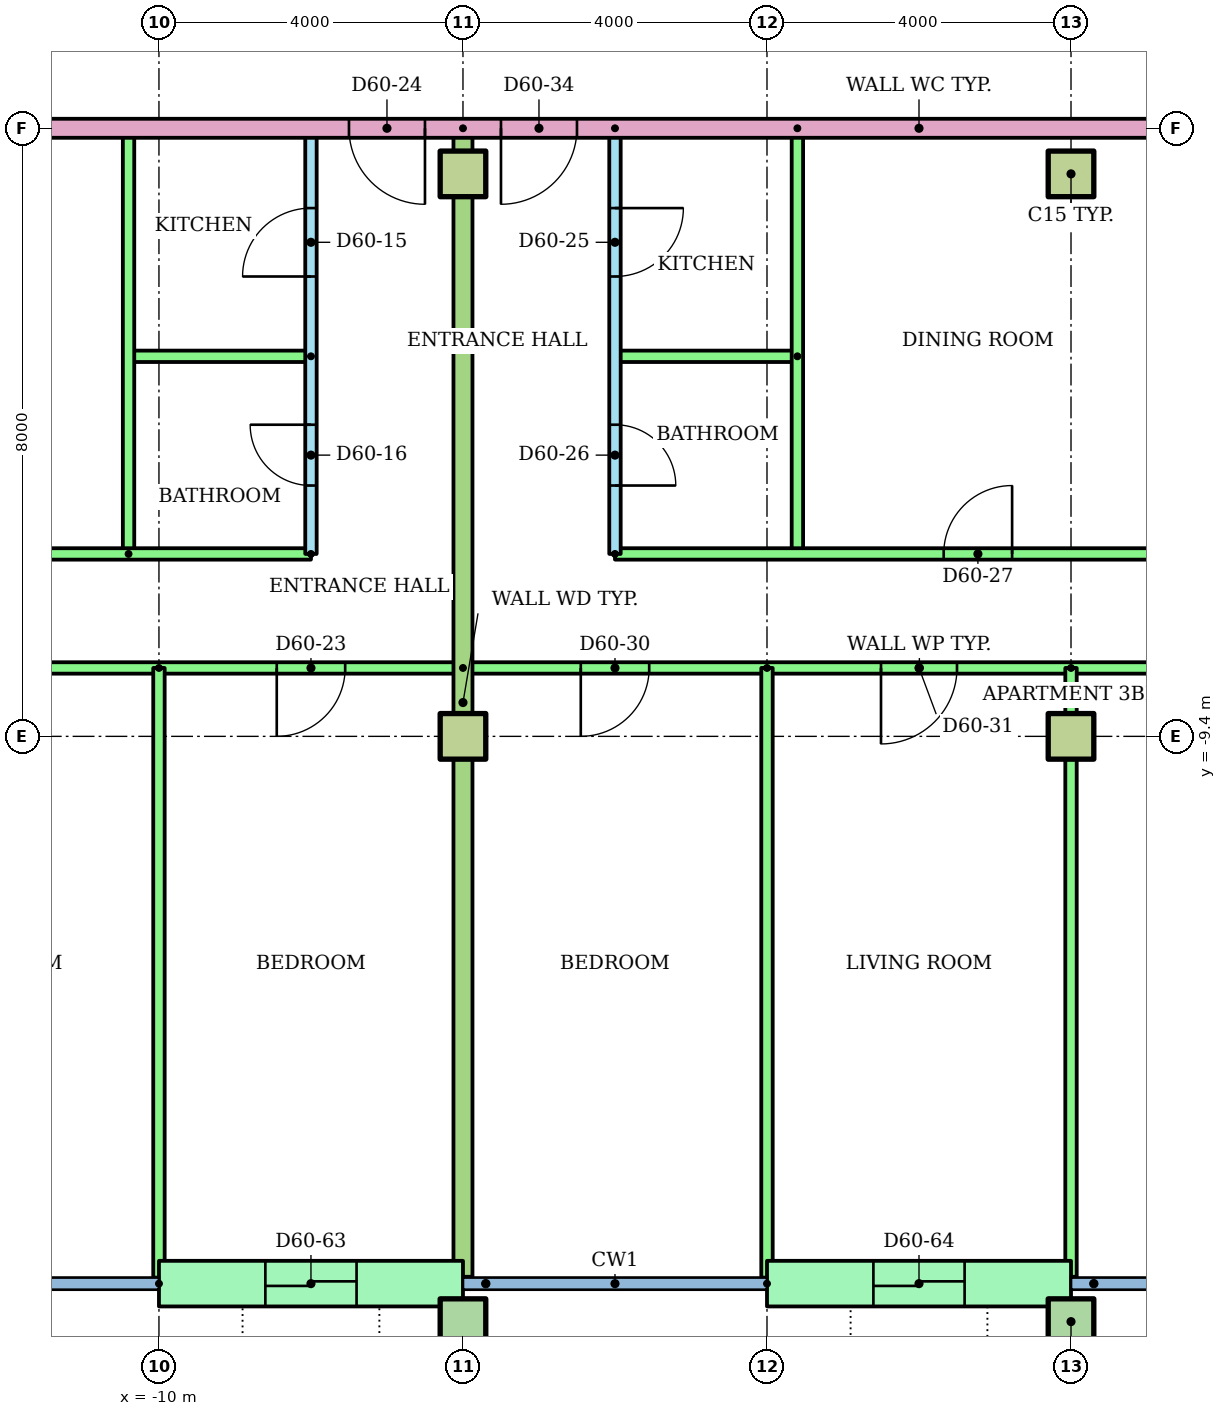
"""IFC4 building model, lengths in metres.
Left out: names, types, materials, properties, quantities, classifications, styles, units other than length and angle.
Written with IfcOpenShell. Run it as: python <this file> out.ifc"""

import sys

from ifc_helpers import new_model, si_unit, direction, frame, frame_2d, origin, origin_2d, place, context, subcontext, project, spatial, rectangle, hollow_rectangle, extrude, element, fill, save


model = new_model("IFC4")
c1 = context("Model", 3, precision=1e-05, world=origin(), true_north=direction((0.0, 1.0)))
c2 = subcontext(c1, "Body", "Model", "MODEL_VIEW")
j1 = project(units=[si_unit("LENGTHUNIT", "METRE"), si_unit("PLANEANGLEUNIT", "RADIAN")], contexts=[c1])
p1 = place(None, origin())
s1 = spatial("IfcSite", under=j1, at=p1, CompositionType="ELEMENT")
p2 = place(p1, origin())
s2 = spatial("IfcBuilding", under=s1, at=p2, CompositionType="ELEMENT")
p3 = place(p2, frame((0.0, 0.0, 230.0)))
s3 = spatial("IfcBuildingStorey", under=s2, at=p3, CompositionType="ELEMENT", Elevation=230.0)
for number, where in (
    (1, (-6.0, -17.1, 0.0)),
    (2, (2.0, -17.1, 0.0)),
):
    element("IfcColumn", number, at=place(p3, frame(where)), inside=s3, PredefinedType="COLUMN", context=c2, shape_type="SweptSolid", body=[
        extrude(hollow_rectangle(XDim=0.6, YDim=0.6, WallThickness=0.03, at=origin_2d()), origin(), (0.0, 0.0, 1.0), 3.2),
    ])
for number, where in (
    (3, (-6.0, -9.4, 0.0)),
    (4, (2.0, -9.4, 0.0)),
    (5, (-6.0, -2.0, 0.0)),
    (6, (2.0, -2.0, 0.0)),
):
    element("IfcColumn", number, at=place(p3, frame(where)), inside=s3, PredefinedType="COLUMN", context=c2, shape_type="SweptSolid", body=[
        extrude(rectangle(XDim=0.6, YDim=0.6, at=origin_2d()), origin(), (0.0, 0.0, 1.0), 3.2),
    ])
p4 = place(p3, frame((-10.0, -16.6, 0.0)))
e7 = element("IfcWall", 7, at=p4, inside=s3, PredefinedType="STANDARD", context=c2, shape_type="SweptSolid", body=[
    extrude(rectangle(XDim=4.0, YDim=0.6, at=frame_2d((2.0, 0.0))), origin(), (0.0, 0.0, 1.0), 2.92),
])
p5 = place(p4, frame((1.4, 0.0, 0.0)))
e8 = element("IfcOpeningElement", 8, at=p5, cuts=e7, PredefinedType="OPENING", context=c2, shape_type="SweptSolid", body=[
    extrude(rectangle(XDim=1.2, YDim=2.1, at=frame_2d((0.6, 1.05))), frame((0.0, 0.31, 0.0), z_axis=(0.0, -1.0, 0.0), x_axis=(1.0, 0.0, 0.0)), (0.0, 0.0, 1.0), 0.62),
])
p6 = place(p3, frame((-2.0, -16.6, 0.0)))
e9 = element("IfcWall", 9, at=p6, inside=s3, PredefinedType="STANDARD", context=c2, shape_type="SweptSolid", body=[
    extrude(rectangle(XDim=4.0, YDim=0.6, at=frame_2d((2.0, 0.0))), origin(), (0.0, 0.0, 1.0), 2.92),
])
p7 = place(p6, frame((1.4, 0.0, 0.0)))
e10 = element("IfcOpeningElement", 10, at=p7, cuts=e9, PredefinedType="OPENING", context=c2, shape_type="SweptSolid", body=[
    extrude(rectangle(XDim=1.2, YDim=2.1, at=frame_2d((0.6, 1.05))), frame((0.0, 0.31, 0.0), z_axis=(0.0, -1.0, 0.0), x_axis=(1.0, 0.0, 0.0)), (0.0, 0.0, 1.0), 0.62),
])
p8 = place(p3, frame((-8.0, -7.0, 0.0), z_axis=(0.0, 0.0, 1.0), x_axis=(0.0, 1.0, 0.0)))
e11 = element("IfcWall", 11, at=p8, inside=s3, PredefinedType="PARTITIONING", context=c2, shape_type="SweptSolid", body=[
    extrude(rectangle(XDim=5.6, YDim=0.15, at=frame_2d((2.8, 0.0))), origin(), (0.0, 0.0, 1.0), 2.4),
])
p9 = place(p8, frame((3.65, 0.0, 0.0)))
e12 = element("IfcOpeningElement", 12, at=p9, cuts=e11, PredefinedType="OPENING", context=c2, shape_type="SweptSolid", body=[
    extrude(rectangle(XDim=0.9, YDim=2.1, at=frame_2d((0.45, 1.05))), frame((0.0, 0.085, 0.0), z_axis=(0.0, -1.0, 0.0), x_axis=(1.0, 0.0, 0.0)), (0.0, 0.0, 1.0), 0.17),
])
p10 = place(p8, frame((0.9, 0.0, 0.0)))
e13 = element("IfcOpeningElement", 13, at=p10, cuts=e11, PredefinedType="OPENING", context=c2, shape_type="SweptSolid", body=[
    extrude(rectangle(XDim=0.8, YDim=2.1, at=frame_2d((0.4, 1.05))), frame((0.0, 0.085, 0.0), z_axis=(0.0, -1.0, 0.0), x_axis=(1.0, 0.0, 0.0)), (0.0, 0.0, 1.0), 0.17),
])
p11 = place(p3, frame((-8.0, -4.4, 0.0), z_axis=(0.0, 0.0, 1.0), x_axis=(-1.0, 0.0, 0.0)))
e14 = element("IfcWall", 14, at=p11, inside=s3, PredefinedType="PARTITIONING", context=c2, shape_type="SweptSolid", body=[
    extrude(rectangle(XDim=2.4, YDim=0.15, at=frame_2d((1.2, 0.0))), origin(), (0.0, 0.0, 1.0), 2.4),
])
p12 = place(p3, frame((-10.4, -7.0, 0.0), z_axis=(0.0, 0.0, 1.0), x_axis=(0.0, 1.0, 0.0)))
e15 = element("IfcWall", 15, at=p12, inside=s3, PredefinedType="PARTITIONING", context=c2, shape_type="SweptSolid", body=[
    extrude(rectangle(XDim=5.6, YDim=0.15, at=frame_2d((2.8, 0.0))), origin(), (0.0, 0.0, 1.0), 2.4),
])
p13 = place(p3, frame((-28.91, -7.0, 0.0)))
e16 = element("IfcWall", 16, at=p13, inside=s3, PredefinedType="PARTITIONING", context=c2, shape_type="SweptSolid", body=[
    extrude(rectangle(XDim=20.91, YDim=0.15, at=frame_2d((10.455, 0.0))), origin(), (0.0, 0.0, 1.0), 2.4),
])
p14 = place(p13, frame((15.81, 0.0, 0.0)))
e17 = element("IfcOpeningElement", 17, at=p14, cuts=e16, PredefinedType="OPENING", context=c2, shape_type="SweptSolid", body=[
    extrude(rectangle(XDim=0.9, YDim=2.1, at=frame_2d((0.45, 1.05))), frame((0.0, 0.085, 0.0), z_axis=(0.0, -1.0, 0.0), x_axis=(1.0, 0.0, 0.0)), (0.0, 0.0, 1.0), 0.17),
])
p15 = place(p13, frame((10.56, 0.0, 0.0)))
e18 = element("IfcOpeningElement", 18, at=p15, cuts=e16, PredefinedType="OPENING", context=c2, shape_type="SweptSolid", body=[
    extrude(rectangle(XDim=0.9, YDim=2.1, at=frame_2d((0.45, 1.05))), frame((0.0, 0.085, 0.0), z_axis=(0.0, -1.0, 0.0), x_axis=(1.0, 0.0, 0.0)), (0.0, 0.0, 1.0), 0.17),
])
p16 = place(p13, frame((3.66, 0.0, 0.0)))
e19 = element("IfcOpeningElement", 19, at=p16, cuts=e16, PredefinedType="OPENING", context=c2, shape_type="SweptSolid", body=[
    extrude(rectangle(XDim=0.9, YDim=2.1, at=frame_2d((0.45, 1.05))), frame((0.0, 0.085, 0.0), z_axis=(0.0, -1.0, 0.0), x_axis=(1.0, 0.0, 0.0)), (0.0, 0.0, 1.0), 0.17),
])
p17 = place(p3, frame((-6.0, -8.5, 0.0), z_axis=(0.0, 0.0, 1.0), x_axis=(-1.0, 0.0, 0.0)))
e20 = element("IfcWall", 20, at=p17, inside=s3, PredefinedType="PARTITIONING", context=c2, shape_type="SweptSolid", body=[
    extrude(rectangle(XDim=22.91, YDim=0.15, at=frame_2d((11.455, 0.0))), origin(), (0.0, 0.0, 1.0), 2.4),
])
p18 = place(p17, frame((20.0, 0.0, 0.0)))
e21 = element("IfcOpeningElement", 21, at=p18, cuts=e20, PredefinedType="OPENING", context=c2, shape_type="SweptSolid", body=[
    extrude(rectangle(XDim=0.9, YDim=2.1, at=frame_2d((0.45, 1.05))), frame((0.0, 0.085, 0.0), z_axis=(0.0, -1.0, 0.0), x_axis=(1.0, 0.0, 0.0)), (0.0, 0.0, 1.0), 0.17),
])
p19 = place(p17, frame((12.6, 0.0, 0.0)))
e22 = element("IfcOpeningElement", 22, at=p19, cuts=e20, PredefinedType="OPENING", context=c2, shape_type="SweptSolid", body=[
    extrude(rectangle(XDim=1.0, YDim=2.1, at=frame_2d((0.5, 1.05))), frame((0.0, 0.085, 0.0), z_axis=(0.0, -1.0, 0.0), x_axis=(1.0, 0.0, 0.0)), (0.0, 0.0, 1.0), 0.17),
])
p20 = place(p17, frame((5.55, 0.0, 0.0)))
e23 = element("IfcOpeningElement", 23, at=p20, cuts=e20, PredefinedType="OPENING", context=c2, shape_type="SweptSolid", body=[
    extrude(rectangle(XDim=0.9, YDim=2.1, at=frame_2d((0.45, 1.05))), frame((0.0, 0.085, 0.0), z_axis=(0.0, -1.0, 0.0), x_axis=(1.0, 0.0, 0.0)), (0.0, 0.0, 1.0), 0.17),
])
p21 = place(p17, frame((1.55, 0.0, 0.0)))
e24 = element("IfcOpeningElement", 24, at=p21, cuts=e20, PredefinedType="OPENING", context=c2, shape_type="SweptSolid", body=[
    extrude(rectangle(XDim=0.9, YDim=2.1, at=frame_2d((0.45, 1.05))), frame((0.0, 0.085, 0.0), z_axis=(0.0, -1.0, 0.0), x_axis=(1.0, 0.0, 0.0)), (0.0, 0.0, 1.0), 0.17),
])
p22 = place(p3, frame((-10.0, -8.5, 0.0), z_axis=(0.0, 0.0, 1.0), x_axis=(0.0, -1.0, 0.0)))
e25 = element("IfcWall", 25, at=p22, inside=s3, PredefinedType="PARTITIONING", context=c2, shape_type="SweptSolid", body=[
    extrude(rectangle(XDim=8.021, YDim=0.15, at=frame_2d((4.01, 0.0))), origin(), (0.0, 0.0, 1.0), 2.4),
])
p23 = place(p3, frame((-4.0, -1.4, 0.0), z_axis=(0.0, 0.0, 1.0), x_axis=(0.0, -1.0, 0.0)))
e26 = element("IfcWall", 26, at=p23, inside=s3, PredefinedType="PARTITIONING", context=c2, shape_type="SweptSolid", body=[
    extrude(rectangle(XDim=5.6, YDim=0.15, at=frame_2d((2.8, 0.0))), origin(), (0.0, 0.0, 1.0), 2.4),
])
p24 = place(p23, frame((1.05, 0.0, 0.0)))
e27 = element("IfcOpeningElement", 27, at=p24, cuts=e26, PredefinedType="OPENING", context=c2, shape_type="SweptSolid", body=[
    extrude(rectangle(XDim=0.9, YDim=2.1, at=frame_2d((0.45, 1.05))), frame((0.0, 0.085, 0.0), z_axis=(0.0, -1.0, 0.0), x_axis=(1.0, 0.0, 0.0)), (0.0, 0.0, 1.0), 0.17),
])
p25 = place(p23, frame((3.9, 0.0, 0.0)))
e28 = element("IfcOpeningElement", 28, at=p25, cuts=e26, PredefinedType="OPENING", context=c2, shape_type="SweptSolid", body=[
    extrude(rectangle(XDim=0.8, YDim=2.1, at=frame_2d((0.4, 1.05))), frame((0.0, 0.085, 0.0), z_axis=(0.0, -1.0, 0.0), x_axis=(1.0, 0.0, 0.0)), (0.0, 0.0, 1.0), 0.17),
])
p26 = place(p3, frame((-1.6, -4.4, 0.0), z_axis=(0.0, 0.0, 1.0), x_axis=(-1.0, 0.0, 0.0)))
e29 = element("IfcWall", 29, at=p26, inside=s3, PredefinedType="PARTITIONING", context=c2, shape_type="SweptSolid", body=[
    extrude(rectangle(XDim=2.4, YDim=0.15, at=frame_2d((1.2, 0.0))), origin(), (0.0, 0.0, 1.0), 2.4),
])
p27 = place(p3, frame((-1.6, -1.4, 0.0), z_axis=(0.0, 0.0, 1.0), x_axis=(0.0, -1.0, 0.0)))
e30 = element("IfcWall", 30, at=p27, inside=s3, PredefinedType="PARTITIONING", context=c2, shape_type="SweptSolid", body=[
    extrude(rectangle(XDim=5.6, YDim=0.15, at=frame_2d((2.8, 0.0))), origin(), (0.0, 0.0, 1.0), 2.4),
])
p28 = place(p3, frame((-4.0, -7.0, 0.0)))
e31 = element("IfcWall", 31, at=p28, inside=s3, PredefinedType="PARTITIONING", context=c2, shape_type="SweptSolid", body=[
    extrude(rectangle(XDim=14.0, YDim=0.15, at=frame_2d((7.0, 0.0))), origin(), (0.0, 0.0, 1.0), 2.4),
])
p29 = place(p28, frame((4.325, 0.0, 0.0)))
e32 = element("IfcOpeningElement", 32, at=p29, cuts=e31, PredefinedType="OPENING", context=c2, shape_type="SweptSolid", body=[
    extrude(rectangle(XDim=0.9, YDim=2.1, at=frame_2d((0.45, 1.05))), frame((0.0, 0.085, 0.0), z_axis=(0.0, -1.0, 0.0), x_axis=(1.0, 0.0, 0.0)), (0.0, 0.0, 1.0), 0.17),
])
p30 = place(p28, frame((8.575, 0.0, 0.0)))
e33 = element("IfcOpeningElement", 33, at=p30, cuts=e31, PredefinedType="OPENING", context=c2, shape_type="SweptSolid", body=[
    extrude(rectangle(XDim=0.9, YDim=2.1, at=frame_2d((0.45, 1.05))), frame((0.0, 0.085, 0.0), z_axis=(0.0, -1.0, 0.0), x_axis=(1.0, 0.0, 0.0)), (0.0, 0.0, 1.0), 0.17),
])
p31 = place(p28, frame((12.0, 0.0, 0.0)))
e34 = element("IfcOpeningElement", 34, at=p31, cuts=e31, PredefinedType="OPENING", context=c2, shape_type="SweptSolid", body=[
    extrude(rectangle(XDim=0.9, YDim=2.1, at=frame_2d((0.45, 1.05))), frame((0.0, 0.085, 0.0), z_axis=(0.0, -1.0, 0.0), x_axis=(1.0, 0.0, 0.0)), (0.0, 0.0, 1.0), 0.17),
])
p32 = place(p3, frame((10.0, -8.5, 0.0), z_axis=(0.0, 0.0, 1.0), x_axis=(-1.0, 0.0, 0.0)))
e35 = element("IfcWall", 35, at=p32, inside=s3, PredefinedType="PARTITIONING", context=c2, shape_type="SweptSolid", body=[
    extrude(rectangle(XDim=16.0, YDim=0.15, at=frame_2d((8.0, 0.0))), origin(), (0.0, 0.0, 1.0), 2.4),
])
p33 = place(p32, frame((13.55, 0.0, 0.0)))
e36 = element("IfcOpeningElement", 36, at=p33, cuts=e35, PredefinedType="OPENING", context=c2, shape_type="SweptSolid", body=[
    extrude(rectangle(XDim=0.9, YDim=2.1, at=frame_2d((0.45, 1.05))), frame((0.0, 0.085, 0.0), z_axis=(0.0, -1.0, 0.0), x_axis=(1.0, 0.0, 0.0)), (0.0, 0.0, 1.0), 0.17),
])
p34 = place(p32, frame((9.5, 0.0, 0.0)))
e37 = element("IfcOpeningElement", 37, at=p34, cuts=e35, PredefinedType="OPENING", context=c2, shape_type="SweptSolid", body=[
    extrude(rectangle(XDim=1.0, YDim=2.1, at=frame_2d((0.5, 1.05))), frame((0.0, 0.085, 0.0), z_axis=(0.0, -1.0, 0.0), x_axis=(1.0, 0.0, 0.0)), (0.0, 0.0, 1.0), 0.17),
])
p35 = place(p32, frame((5.55, 0.0, 0.0)))
e38 = element("IfcOpeningElement", 38, at=p35, cuts=e35, PredefinedType="OPENING", context=c2, shape_type="SweptSolid", body=[
    extrude(rectangle(XDim=0.9, YDim=2.1, at=frame_2d((0.45, 1.05))), frame((0.0, 0.085, 0.0), z_axis=(0.0, -1.0, 0.0), x_axis=(1.0, 0.0, 0.0)), (0.0, 0.0, 1.0), 0.17),
])
p36 = place(p32, frame((1.55, 0.0, 0.0)))
e39 = element("IfcOpeningElement", 39, at=p36, cuts=e35, PredefinedType="OPENING", context=c2, shape_type="SweptSolid", body=[
    extrude(rectangle(XDim=0.9, YDim=2.1, at=frame_2d((0.45, 1.05))), frame((0.0, 0.085, 0.0), z_axis=(0.0, -1.0, 0.0), x_axis=(1.0, 0.0, 0.0)), (0.0, 0.0, 1.0), 0.17),
])
p37 = place(p3, frame((-2.0, -8.5, 0.0), z_axis=(0.0, 0.0, 1.0), x_axis=(0.0, -1.0, 0.0)))
e40 = element("IfcWall", 40, at=p37, inside=s3, PredefinedType="PARTITIONING", context=c2, shape_type="SweptSolid", body=[
    extrude(rectangle(XDim=8.021, YDim=0.15, at=frame_2d((4.01, 0.0))), origin(), (0.0, 0.0, 1.0), 2.4),
])
p38 = place(p3, frame((2.0, -8.5, 0.0), z_axis=(0.0, 0.0, 1.0), x_axis=(0.0, -1.0, 0.0)))
e41 = element("IfcWall", 41, at=p38, inside=s3, PredefinedType="PARTITIONING", context=c2, shape_type="SweptSolid", body=[
    extrude(rectangle(XDim=8.01, YDim=0.15, at=frame_2d((4.005, 0.0))), origin(), (0.0, 0.0, 1.0), 2.4),
])
p39 = place(p3, frame((-6.0, -1.4, 0.0), z_axis=(0.0, 0.0, 1.0), x_axis=(0.0, -1.0, 0.0)))
e42 = element("IfcWall", 42, at=p39, inside=s3, PredefinedType="PARTITIONING", context=c2, shape_type="SweptSolid", body=[
    extrude(rectangle(XDim=15.11, YDim=0.25, at=frame_2d((7.555, 0.0))), origin(), (0.0, 0.0, 1.0), 2.4),
])
p40 = place(p3, frame((14.0, -1.4, 0.0), z_axis=(0.0, 0.0, 1.0), x_axis=(-1.0, 0.0, 0.0)))
e43 = element("IfcWall", 43, at=p40, inside=s3, PredefinedType="PARTITIONING", context=c2, shape_type="SweptSolid", body=[
    extrude(rectangle(XDim=28.0, YDim=0.25, at=frame_2d((14.0, 0.0))), origin(), (0.0, 0.0, 1.0), 2.4),
])
p41 = place(p40, frame((20.5, 0.0, 0.0)))
e44 = element("IfcOpeningElement", 44, at=p41, cuts=e43, PredefinedType="OPENING", context=c2, shape_type="SweptSolid", body=[
    extrude(rectangle(XDim=1.0, YDim=2.1, at=frame_2d((0.5, 1.05))), frame((0.0, 0.135, 0.0), z_axis=(0.0, -1.0, 0.0), x_axis=(1.0, 0.0, 0.0)), (0.0, 0.0, 1.0), 0.27),
])
p42 = place(p40, frame((18.5, 0.0, 0.0)))
e45 = element("IfcOpeningElement", 45, at=p42, cuts=e43, PredefinedType="OPENING", context=c2, shape_type="SweptSolid", body=[
    extrude(rectangle(XDim=1.0, YDim=2.1, at=frame_2d((0.5, 1.05))), frame((0.0, 0.135, 0.0), z_axis=(0.0, -1.0, 0.0), x_axis=(1.0, 0.0, 0.0)), (0.0, 0.0, 1.0), 0.27),
])
p43 = place(p40, frame((2.5, 0.0, 0.0)))
e46 = element("IfcOpeningElement", 46, at=p43, cuts=e43, PredefinedType="OPENING", context=c2, shape_type="SweptSolid", body=[
    extrude(rectangle(XDim=1.0, YDim=2.1, at=frame_2d((0.5, 1.05))), frame((0.0, 0.135, 0.0), z_axis=(0.0, -1.0, 0.0), x_axis=(1.0, 0.0, 0.0)), (0.0, 0.0, 1.0), 0.27),
])
p44 = place(p9, origin())
e47 = element("IfcDoor", 47, at=p44, inside=s3, OperationType="SINGLE_SWING_LEFT", PredefinedType="DOOR", context=c2, shape_type="SweptSolid", body=[
    extrude(rectangle(XDim=0.9, YDim=2.1, at=frame_2d((0.45, 1.05))), frame((0.0, 0.025, 0.0), z_axis=(0.0, -1.0, 0.0), x_axis=(1.0, 0.0, 0.0)), (0.0, 0.0, 1.0), 0.05),
])
fill(e12, e47)
p45 = place(p10, origin())
e48 = element("IfcDoor", 48, at=p45, inside=s3, OperationType="SINGLE_SWING_RIGHT", PredefinedType="DOOR", context=c2, shape_type="SweptSolid", body=[
    extrude(rectangle(XDim=0.8, YDim=2.1, at=frame_2d((0.4, 1.05))), frame((0.0, 0.025, 0.0), z_axis=(0.0, -1.0, 0.0), x_axis=(1.0, 0.0, 0.0)), (0.0, 0.0, 1.0), 0.05),
])
fill(e13, e48)
p46 = place(p21, origin())
e49 = element("IfcDoor", 49, at=p46, inside=s3, OperationType="SINGLE_SWING_RIGHT", PredefinedType="DOOR", context=c2, shape_type="SweptSolid", body=[
    extrude(rectangle(XDim=0.9, YDim=2.1, at=frame_2d((0.45, 1.05))), frame((0.0, 0.025, 0.0), z_axis=(0.0, -1.0, 0.0), x_axis=(1.0, 0.0, 0.0)), (0.0, 0.0, 1.0), 0.05),
])
fill(e24, e49)
p47 = place(p41, origin())
e50 = element("IfcDoor", 50, at=p47, inside=s3, OperationType="SINGLE_SWING_LEFT", PredefinedType="DOOR", context=c2, shape_type="SweptSolid", body=[
    extrude(rectangle(XDim=1.0, YDim=2.1, at=frame_2d((0.5, 1.05))), frame((0.0, 0.025, 0.0), z_axis=(0.0, -1.0, 0.0), x_axis=(1.0, 0.0, 0.0)), (0.0, 0.0, 1.0), 0.05),
])
fill(e44, e50)
p48 = place(p24, origin())
e51 = element("IfcDoor", 51, at=p48, inside=s3, OperationType="SINGLE_SWING_LEFT", PredefinedType="DOOR", context=c2, shape_type="SweptSolid", body=[
    extrude(rectangle(XDim=0.9, YDim=2.1, at=frame_2d((0.45, 1.05))), frame((0.0, 0.025, 0.0), z_axis=(0.0, -1.0, 0.0), x_axis=(1.0, 0.0, 0.0)), (0.0, 0.0, 1.0), 0.05),
])
fill(e27, e51)
p49 = place(p25, origin())
e52 = element("IfcDoor", 52, at=p49, inside=s3, OperationType="SINGLE_SWING_RIGHT", PredefinedType="DOOR", context=c2, shape_type="SweptSolid", body=[
    extrude(rectangle(XDim=0.8, YDim=2.1, at=frame_2d((0.4, 1.05))), frame((0.0, 0.025, 0.0), z_axis=(0.0, -1.0, 0.0), x_axis=(1.0, 0.0, 0.0)), (0.0, 0.0, 1.0), 0.05),
])
fill(e28, e52)
p50 = place(p29, origin())
e53 = element("IfcDoor", 53, at=p50, inside=s3, OperationType="SINGLE_SWING_RIGHT", PredefinedType="DOOR", context=c2, shape_type="SweptSolid", body=[
    extrude(rectangle(XDim=0.9, YDim=2.1, at=frame_2d((0.45, 1.05))), frame((0.0, 0.025, 0.0), z_axis=(0.0, -1.0, 0.0), x_axis=(1.0, 0.0, 0.0)), (0.0, 0.0, 1.0), 0.05),
])
fill(e32, e53)
p51 = place(p33, origin())
e54 = element("IfcDoor", 54, at=p51, inside=s3, OperationType="SINGLE_SWING_RIGHT", PredefinedType="DOOR", context=c2, shape_type="SweptSolid", body=[
    extrude(rectangle(XDim=0.9, YDim=2.1, at=frame_2d((0.45, 1.05))), frame((0.0, 0.025, 0.0), z_axis=(0.0, -1.0, 0.0), x_axis=(1.0, 0.0, 0.0)), (0.0, 0.0, 1.0), 0.05),
])
fill(e36, e54)
p52 = place(p34, origin())
e55 = element("IfcDoor", 55, at=p52, inside=s3, OperationType="SINGLE_SWING_RIGHT", PredefinedType="DOOR", context=c2, shape_type="SweptSolid", body=[
    extrude(rectangle(XDim=1.0, YDim=2.1, at=frame_2d((0.5, 1.05))), frame((0.0, 0.025, 0.0), z_axis=(0.0, -1.0, 0.0), x_axis=(1.0, 0.0, 0.0)), (0.0, 0.0, 1.0), 0.05),
])
fill(e37, e55)
p53 = place(p42, origin())
e56 = element("IfcDoor", 56, at=p53, inside=s3, OperationType="SINGLE_SWING_RIGHT", PredefinedType="DOOR", context=c2, shape_type="SweptSolid", body=[
    extrude(rectangle(XDim=1.0, YDim=2.1, at=frame_2d((0.5, 1.05))), frame((0.0, 0.025, 0.0), z_axis=(0.0, -1.0, 0.0), x_axis=(1.0, 0.0, 0.0)), (0.0, 0.0, 1.0), 0.05),
])
fill(e45, e56)
p54 = place(p5, origin())
e57 = element("IfcDoor", 57, at=p54, inside=s3, OperationType="SLIDING_TO_LEFT", PredefinedType="DOOR", context=c2, shape_type="SweptSolid", body=[
    extrude(rectangle(XDim=1.2, YDim=2.1, at=frame_2d((0.6, 1.05))), frame((0.0, 0.025, 0.0), z_axis=(0.0, -1.0, 0.0), x_axis=(1.0, 0.0, 0.0)), (0.0, 0.0, 1.0), 0.05),
])
fill(e8, e57)
p55 = place(p7, origin())
e58 = element("IfcDoor", 58, at=p55, inside=s3, OperationType="SLIDING_TO_LEFT", PredefinedType="DOOR", context=c2, shape_type="SweptSolid", body=[
    extrude(rectangle(XDim=1.2, YDim=2.1, at=frame_2d((0.6, 1.05))), frame((0.0, 0.025, 0.0), z_axis=(0.0, -1.0, 0.0), x_axis=(1.0, 0.0, 0.0)), (0.0, 0.0, 1.0), 0.05),
])
fill(e10, e58)
save(model, sys.argv[1])
